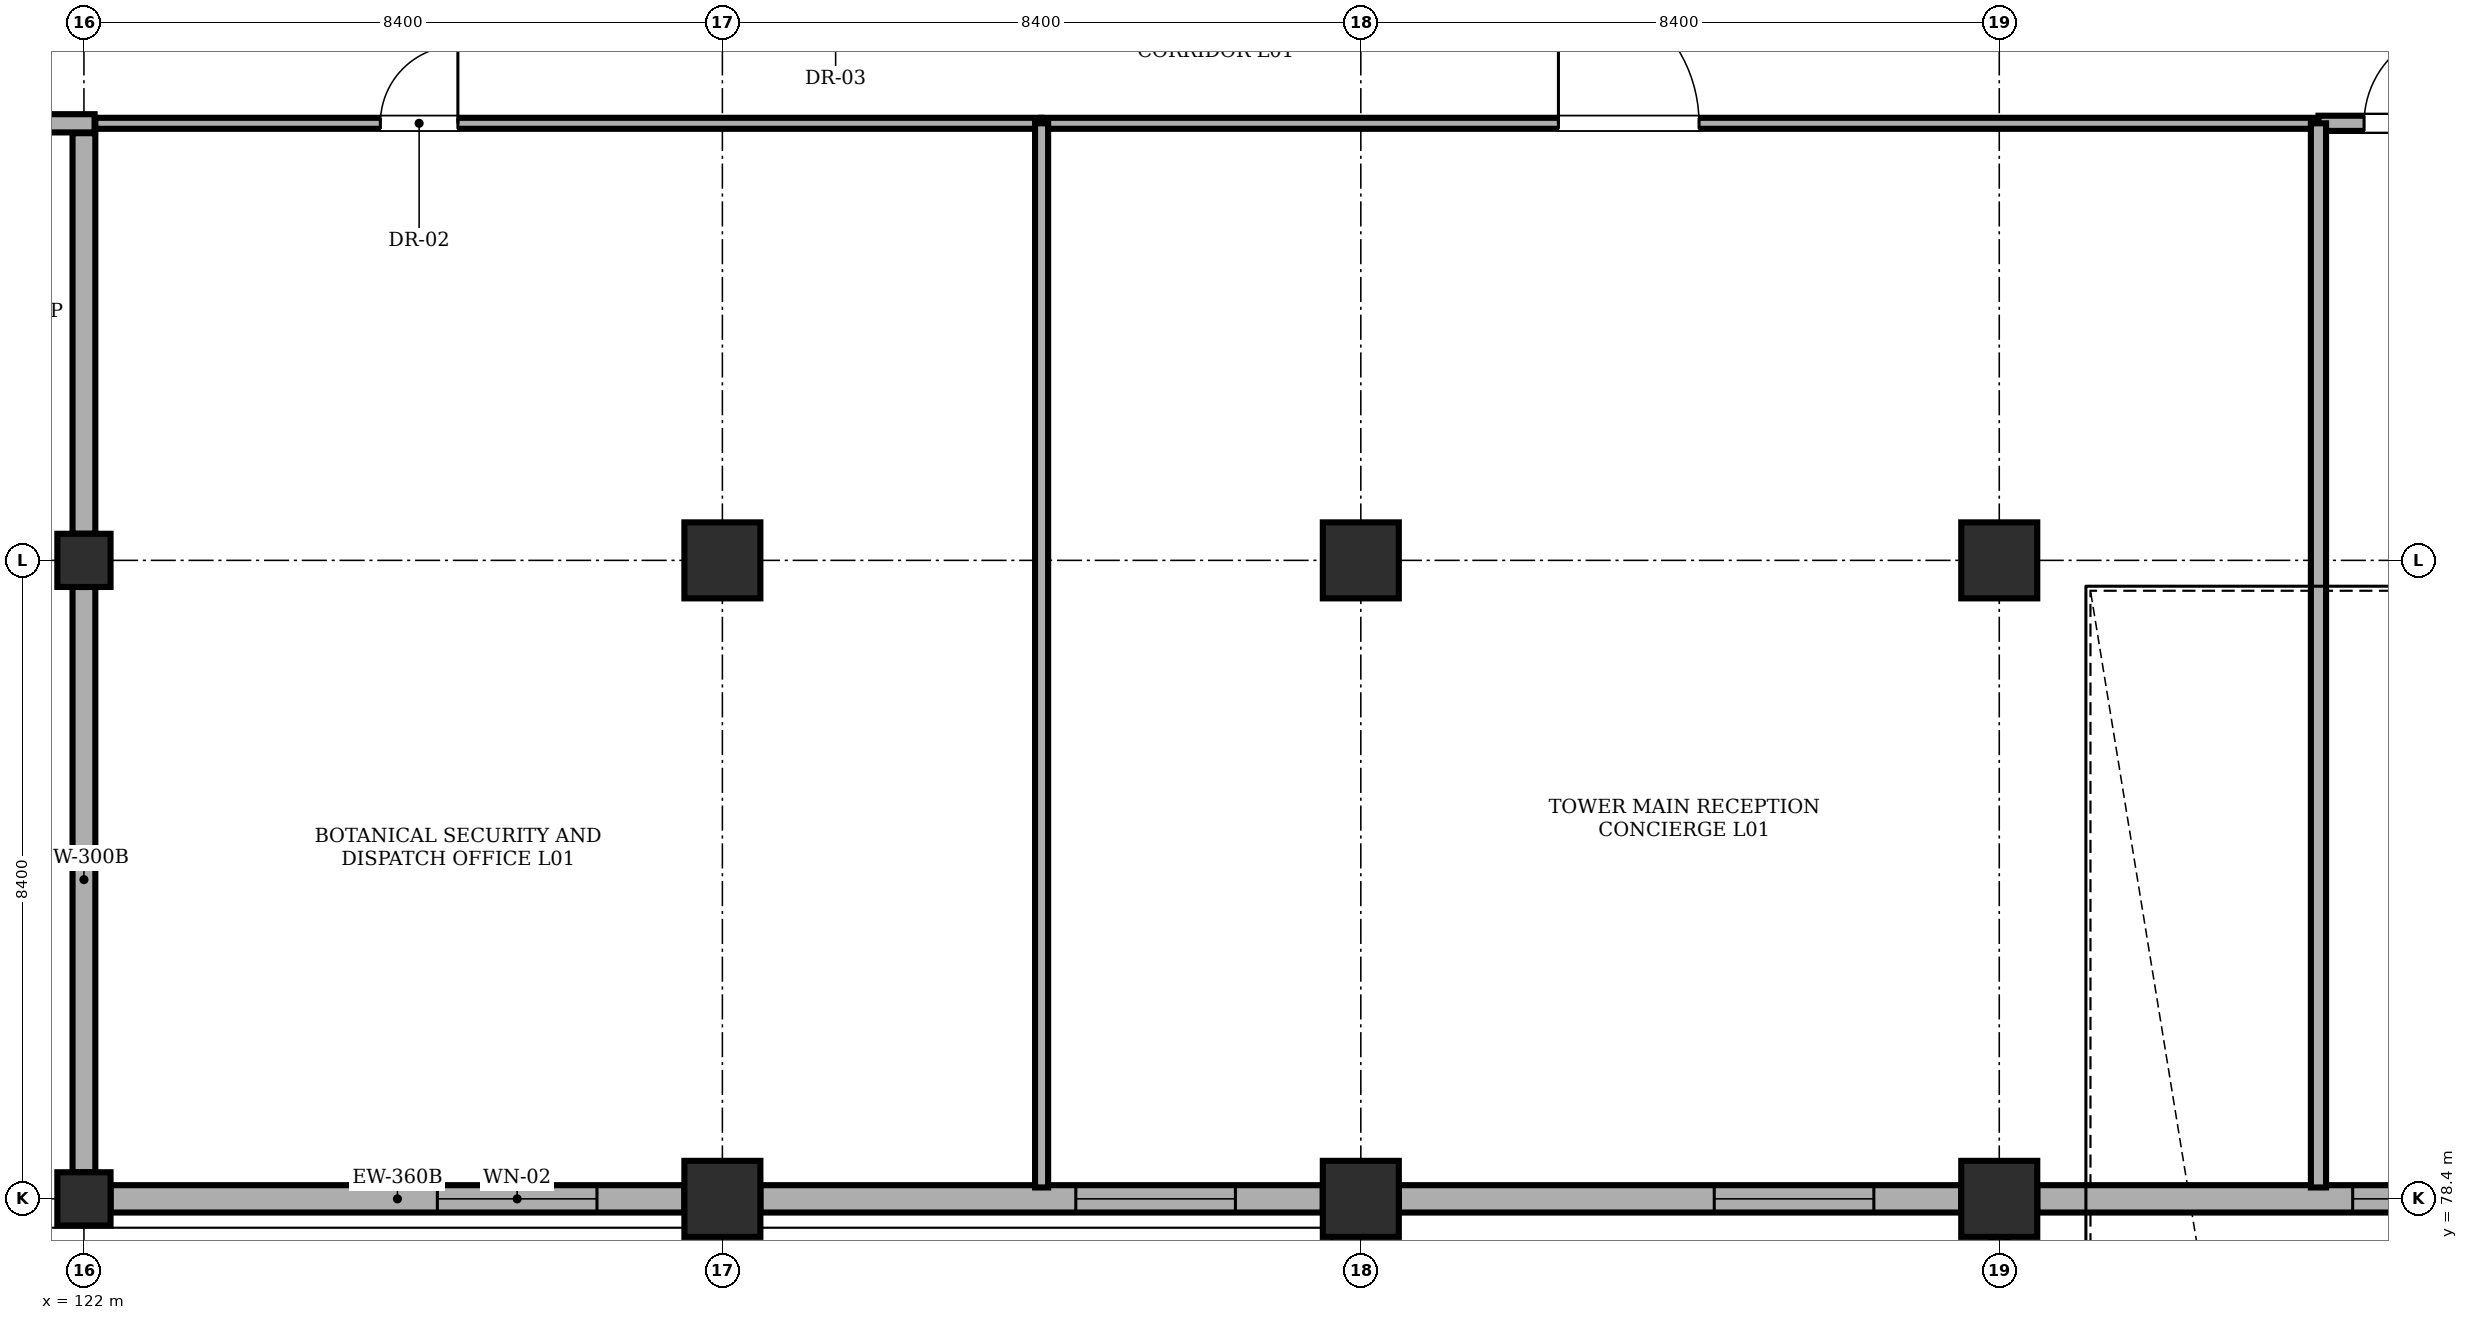
"""IFC4 building model, lengths in metres.
Left out: names, types, materials, properties, quantities, classifications, styles, units other than length and angle.
Written with IfcOpenShell. Run it as: python <this file> out.ifc"""

import sys

from ifc_helpers import new_model, si_unit, direction, frame, frame_2d, origin, origin_2d, place, context, subcontext, project, spatial, rectangle, extrude, element, fill, save


model = new_model("IFC4")
c1 = context("Model", 3, precision=1e-05, world=origin(), true_north=direction((0.0, 1.0)))
c2 = subcontext(c1, "Body", "Model", "MODEL_VIEW")
j1 = project(units=[si_unit("LENGTHUNIT", "METRE"), si_unit("PLANEANGLEUNIT", "RADIAN")], contexts=[c1])
p1 = place(None, origin())
s1 = spatial("IfcSite", under=j1, at=p1, CompositionType="ELEMENT")
p2 = place(p1, origin())
s2 = spatial("IfcBuilding", under=s1, at=p2, CompositionType="ELEMENT")
p3 = place(p2, origin())
s3 = spatial("IfcBuildingStorey", under=s2, at=p3, CompositionType="ELEMENT", Elevation=0.0)
for number, where, z_axis, x_axis in (
    (1, (122.0, 78.4, 0.0), (0.0, 0.0, 1.0), (1.0, 0.0, 0.0)),
    (2, (122.0, 86.8, 0.0), (0.0, 0.0, 1.0), (1.0, 0.0, 0.0)),
):
    element("IfcColumn", number, at=place(p3, frame(where, z_axis=z_axis, x_axis=x_axis)), inside=s3, PredefinedType="COLUMN", context=c2, shape_type="SweptSolid", body=[
        extrude(rectangle(XDim=0.7, YDim=0.7, at=origin_2d()), origin(), (0.0, 0.0, 1.0), 5.18),
    ])
for number, where, z_axis, x_axis in (
    (3, (130.4, 78.4, 0.0), (0.0, 0.0, 1.0), (1.0, 0.0, 0.0)),
    (4, (130.4, 86.8, 0.0), (0.0, 0.0, 1.0), (1.0, 0.0, 0.0)),
    (5, (138.8, 78.4, 0.0), (0.0, 0.0, 1.0), (1.0, 0.0, 0.0)),
    (6, (138.8, 86.8, 0.0), (0.0, 0.0, 1.0), (1.0, 0.0, 0.0)),
    (7, (147.2, 78.4, 0.0), (0.0, 0.0, 1.0), (1.0, 0.0, 0.0)),
    (8, (147.2, 86.8, 0.0), (0.0, 0.0, 1.0), (1.0, 0.0, 0.0)),
):
    element("IfcColumn", number, at=place(p3, frame(where, z_axis=z_axis, x_axis=x_axis)), inside=s3, PredefinedType="COLUMN", context=c2, shape_type="SweptSolid", body=[
        extrude(rectangle(XDim=1.0, YDim=1.0, at=origin_2d()), origin(), (0.0, 0.0, 1.0), 5.18),
    ])
p4 = place(p3, frame((147.2, 49.71, 0.0), z_axis=(0.0, 0.0, 1.0), x_axis=(0.0, 1.0, 0.0)))
e9 = element("IfcWall", 9, at=p4, inside=s3, PredefinedType="SHEAR", context=c2, shape_type="SweptSolid", body=[
    extrude(rectangle(XDim=28.51, YDim=0.22, at=frame_2d((14.255, 0.0))), origin(), (0.0, 0.0, 1.0), 5.25),
])
p5 = place(p3, frame((129.9, 78.4, 0.0), z_axis=(0.0, 0.0, 1.0), x_axis=(-1.0, 0.0, 0.0)))
e10 = element("IfcWall", 10, at=p5, inside=s3, PredefinedType="STANDARD", context=c2, shape_type="SweptSolid", body=[
    extrude(rectangle(XDim=7.55, YDim=0.36, at=frame_2d((3.775, 0.0))), origin(), (0.0, 0.0, 1.0), 4.43),
])
p6 = place(p5, frame((1.15, 0.0, 0.95)))
e11 = element("IfcOpeningElement", 11, at=p6, cuts=e10, PredefinedType="OPENING", context=c2, shape_type="SweptSolid", body=[
    extrude(rectangle(XDim=2.1, YDim=2.1, at=frame_2d((1.05, 1.05))), frame((0.0, 0.19, 0.0), z_axis=(0.0, -1.0, 0.0), x_axis=(1.0, 0.0, 0.0)), (0.0, 0.0, 1.0), 0.38),
])
p7 = place(p3, frame((138.3, 78.4, 0.0), z_axis=(0.0, 0.0, 1.0), x_axis=(-1.0, 0.0, 0.0)))
e12 = element("IfcWall", 12, at=p7, inside=s3, PredefinedType="STANDARD", context=c2, shape_type="SweptSolid", body=[
    extrude(rectangle(XDim=7.4, YDim=0.36, at=frame_2d((3.7, 0.0))), origin(), (0.0, 0.0, 1.0), 3.98),
])
p8 = place(p7, frame((1.15, 0.0, 0.95)))
e13 = element("IfcOpeningElement", 13, at=p8, cuts=e12, PredefinedType="OPENING", context=c2, shape_type="SweptSolid", body=[
    extrude(rectangle(XDim=2.1, YDim=2.1, at=frame_2d((1.05, 1.05))), frame((0.0, 0.19, 0.0), z_axis=(0.0, -1.0, 0.0), x_axis=(1.0, 0.0, 0.0)), (0.0, 0.0, 1.0), 0.38),
])
p9 = place(p3, frame((146.7, 78.4, 0.0), z_axis=(0.0, 0.0, 1.0), x_axis=(-1.0, 0.0, 0.0)))
e14 = element("IfcWall", 14, at=p9, inside=s3, PredefinedType="STANDARD", context=c2, shape_type="SweptSolid", body=[
    extrude(rectangle(XDim=7.4, YDim=0.36, at=frame_2d((3.7, 0.0))), origin(), (0.0, 0.0, 1.0), 3.98),
])
p10 = place(p9, frame((1.15, 0.0, 0.95)))
e15 = element("IfcOpeningElement", 15, at=p10, cuts=e14, PredefinedType="OPENING", context=c2, shape_type="SweptSolid", body=[
    extrude(rectangle(XDim=2.1, YDim=2.1, at=frame_2d((1.05, 1.05))), frame((0.0, 0.19, 0.0), z_axis=(0.0, -1.0, 0.0), x_axis=(1.0, 0.0, 0.0)), (0.0, 0.0, 1.0), 0.38),
])
p11 = place(p3, frame((155.1, 78.4, 0.0), z_axis=(0.0, 0.0, 1.0), x_axis=(-1.0, 0.0, 0.0)))
e16 = element("IfcWall", 16, at=p11, inside=s3, PredefinedType="STANDARD", context=c2, shape_type="SweptSolid", body=[
    extrude(rectangle(XDim=7.4, YDim=0.36, at=frame_2d((3.7, 0.0))), origin(), (0.0, 0.0, 1.0), 3.98),
])
p12 = place(p11, frame((1.15, 0.0, 0.95)))
e17 = element("IfcOpeningElement", 17, at=p12, cuts=e16, PredefinedType="OPENING", context=c2, shape_type="SweptSolid", body=[
    extrude(rectangle(XDim=2.1, YDim=2.1, at=frame_2d((1.05, 1.05))), frame((0.0, 0.19, 0.0), z_axis=(0.0, -1.0, 0.0), x_axis=(1.0, 0.0, 0.0)), (0.0, 0.0, 1.0), 0.38),
])
p13 = place(p3, frame((122.0, 78.75, 0.0), z_axis=(0.0, 0.0, 1.0), x_axis=(0.0, 1.0, 0.0)))
e18 = element("IfcWall", 18, at=p13, inside=s3, PredefinedType="STANDARD", context=c2, shape_type="SweptSolid", body=[
    extrude(rectangle(XDim=7.7, YDim=0.3, at=frame_2d((3.85, 0.0))), origin(), (0.0, 0.0, 1.0), 4.43),
])
p14 = place(p3, frame((122.0, 87.15, 0.0), z_axis=(0.0, 0.0, 1.0), x_axis=(0.0, 1.0, 0.0)))
e19 = element("IfcWall", 19, at=p14, inside=s3, PredefinedType="STANDARD", context=c2, shape_type="SweptSolid", body=[
    extrude(rectangle(XDim=5.27, YDim=0.3, at=frame_2d((2.635, 0.0))), origin(), (0.0, 0.0, 1.0), 4.43),
])
p15 = place(p3, frame((122.14, 92.55, 0.0), z_axis=(0.0, 0.0, 1.0), x_axis=(-1.0, 0.0, 0.0)))
e20 = element("IfcWall", 20, at=p15, inside=s3, PredefinedType="STANDARD", context=c2, shape_type="SweptSolid", body=[
    extrude(rectangle(XDim=1.11, YDim=0.24, at=frame_2d((0.555, 0.0))), origin(), (0.0, 0.0, 1.0), 5.18),
])
p16 = place(p3, frame((122.15, 92.55, 0.0), z_axis=(0.0, 0.0, 1.0), x_axis=(1.0, 0.0, 0.0)))
e21 = element("IfcWall", 21, at=p16, inside=s3, PredefinedType="PARTITIONING", context=c2, shape_type="SweptSolid", body=[
    extrude(rectangle(XDim=12.45, YDim=0.145, at=frame_2d((6.225, 0.0))), origin(), (0.0, 0.0, 1.0), 5.18),
])
p17 = place(p16, frame((3.75, 0.0, 0.0)))
e22 = element("IfcOpeningElement", 22, at=p17, cuts=e21, PredefinedType="OPENING", context=c2, shape_type="SweptSolid", body=[
    extrude(rectangle(XDim=1.02, YDim=2.15, at=frame_2d((0.51, 1.075))), frame((0.0, 0.083, 0.0), z_axis=(0.0, -1.0, 0.0), x_axis=(1.0, 0.0, 0.0)), (0.0, 0.0, 1.0), 0.165),
])
p18 = place(p3, frame((134.6, 92.55, 0.0), z_axis=(0.0, 0.0, 1.0), x_axis=(1.0, 0.0, 0.0)))
e23 = element("IfcWall", 23, at=p18, inside=s3, PredefinedType="PARTITIONING", context=c2, shape_type="SweptSolid", body=[
    extrude(rectangle(XDim=16.8, YDim=0.145, at=frame_2d((8.4, 0.0))), origin(), (0.0, 0.0, 1.0), 5.18),
])
p19 = place(p18, frame((6.8, 0.0, 0.0)))
e24 = element("IfcOpeningElement", 24, at=p19, cuts=e23, PredefinedType="OPENING", context=c2, shape_type="SweptSolid", body=[
    extrude(rectangle(XDim=1.85, YDim=2.25, at=frame_2d((0.925, 1.125))), frame((0.0, 0.083, 0.0), z_axis=(0.0, -1.0, 0.0), x_axis=(1.0, 0.0, 0.0)), (0.0, 0.0, 1.0), 0.165),
])
p20 = place(p3, frame((134.6, 78.55, 0.0), z_axis=(0.0, 0.0, 1.0), x_axis=(0.0, 1.0, 0.0)))
e25 = element("IfcWall", 25, at=p20, inside=s3, PredefinedType="PARTITIONING", context=c2, shape_type="SweptSolid", body=[
    extrude(rectangle(XDim=14.0, YDim=0.172, at=frame_2d((7.0, 0.0))), origin(), (0.0, 0.0, 1.0), 4.63),
])
p21 = place(p3, frame((151.4, 92.55, 0.0), z_axis=(0.0, 0.0, 1.0), x_axis=(1.0, 0.0, 0.0)))
e26 = element("IfcWall", 26, at=p21, inside=s3, PredefinedType="SOLIDWALL", context=c2, shape_type="SweptSolid", body=[
    extrude(rectangle(XDim=7.72, YDim=0.2, at=frame_2d((3.86, 0.0))), origin(), (0.0, 0.0, 1.0), 5.18),
])
p22 = place(p21, frame((0.6, 0.0, 0.0)))
e27 = element("IfcOpeningElement", 27, at=p22, cuts=e26, PredefinedType="OPENING", context=c2, shape_type="SweptSolid", body=[
    extrude(rectangle(XDim=1.25, YDim=2.2, at=frame_2d((0.625, 1.1))), frame((0.0, 0.11, 0.0), z_axis=(0.0, -1.0, 0.0), x_axis=(1.0, 0.0, 0.0)), (0.0, 0.0, 1.0), 0.22),
])
p23 = place(p3, frame((151.4, 78.55, 0.0), z_axis=(0.0, 0.0, 1.0), x_axis=(0.0, 1.0, 0.0)))
e28 = element("IfcWall", 28, at=p23, inside=s3, PredefinedType="SOLIDWALL", context=c2, shape_type="SweptSolid", body=[
    extrude(rectangle(XDim=14.0, YDim=0.2, at=frame_2d((7.0, 0.0))), origin(), (0.0, 0.0, 1.0), 4.78),
])
p24 = place(p6, origin())
e29 = element("IfcWindow", 29, at=p24, inside=s3, PartitioningType="DOUBLE_PANEL_VERTICAL", PredefinedType="WINDOW", context=c2, shape_type="SweptSolid", body=[
    extrude(rectangle(XDim=2.1, YDim=2.1, at=frame_2d((1.05, 1.05))), frame((0.0, 0.03, 0.0), z_axis=(0.0, -1.0, 0.0), x_axis=(1.0, 0.0, 0.0)), (0.0, 0.0, 1.0), 0.06),
])
fill(e11, e29)
p25 = place(p8, origin())
e30 = element("IfcWindow", 30, at=p25, inside=s3, PartitioningType="DOUBLE_PANEL_VERTICAL", PredefinedType="WINDOW", context=c2, shape_type="SweptSolid", body=[
    extrude(rectangle(XDim=2.1, YDim=2.1, at=frame_2d((1.05, 1.05))), frame((0.0, 0.03, 0.0), z_axis=(0.0, -1.0, 0.0), x_axis=(1.0, 0.0, 0.0)), (0.0, 0.0, 1.0), 0.06),
])
fill(e13, e30)
p26 = place(p10, origin())
e31 = element("IfcWindow", 31, at=p26, inside=s3, PartitioningType="DOUBLE_PANEL_VERTICAL", PredefinedType="WINDOW", context=c2, shape_type="SweptSolid", body=[
    extrude(rectangle(XDim=2.1, YDim=2.1, at=frame_2d((1.05, 1.05))), frame((0.0, 0.03, 0.0), z_axis=(0.0, -1.0, 0.0), x_axis=(1.0, 0.0, 0.0)), (0.0, 0.0, 1.0), 0.06),
])
fill(e15, e31)
p27 = place(p12, origin())
e32 = element("IfcWindow", 32, at=p27, inside=s3, PartitioningType="DOUBLE_PANEL_VERTICAL", PredefinedType="WINDOW", context=c2, shape_type="SweptSolid", body=[
    extrude(rectangle(XDim=2.1, YDim=2.1, at=frame_2d((1.05, 1.05))), frame((0.0, 0.03, 0.0), z_axis=(0.0, -1.0, 0.0), x_axis=(1.0, 0.0, 0.0)), (0.0, 0.0, 1.0), 0.06),
])
fill(e17, e32)
p28 = place(p17, origin())
e33 = element("IfcDoor", 33, at=p28, inside=s3, OperationType="SINGLE_SWING_RIGHT", PredefinedType="DOOR", context=c2, shape_type="SweptSolid", body=[
    extrude(rectangle(XDim=1.02, YDim=2.15, at=frame_2d((0.51, 1.075))), frame((0.0, 0.025, 0.0), z_axis=(0.0, -1.0, 0.0), x_axis=(1.0, 0.0, 0.0)), (0.0, 0.0, 1.0), 0.05),
])
fill(e22, e33)
p29 = place(p19, origin())
e34 = element("IfcDoor", 34, at=p29, inside=s3, OperationType="SINGLE_SWING_LEFT", PredefinedType="DOOR", context=c2, shape_type="SweptSolid", body=[
    extrude(rectangle(XDim=1.85, YDim=2.25, at=frame_2d((0.925, 1.125))), frame((0.0, 0.025, 0.0), z_axis=(0.0, -1.0, 0.0), x_axis=(1.0, 0.0, 0.0)), (0.0, 0.0, 1.0), 0.05),
])
fill(e24, e34)
p30 = place(p22, origin())
e35 = element("IfcDoor", 35, at=p30, inside=s3, OperationType="SINGLE_SWING_RIGHT", PredefinedType="DOOR", context=c2, shape_type="SweptSolid", body=[
    extrude(rectangle(XDim=1.25, YDim=2.2, at=frame_2d((0.625, 1.1))), frame((0.0, 0.025, 0.0), z_axis=(0.0, -1.0, 0.0), x_axis=(1.0, 0.0, 0.0)), (0.0, 0.0, 1.0), 0.05),
])
fill(e27, e35)
save(model, sys.argv[1])
